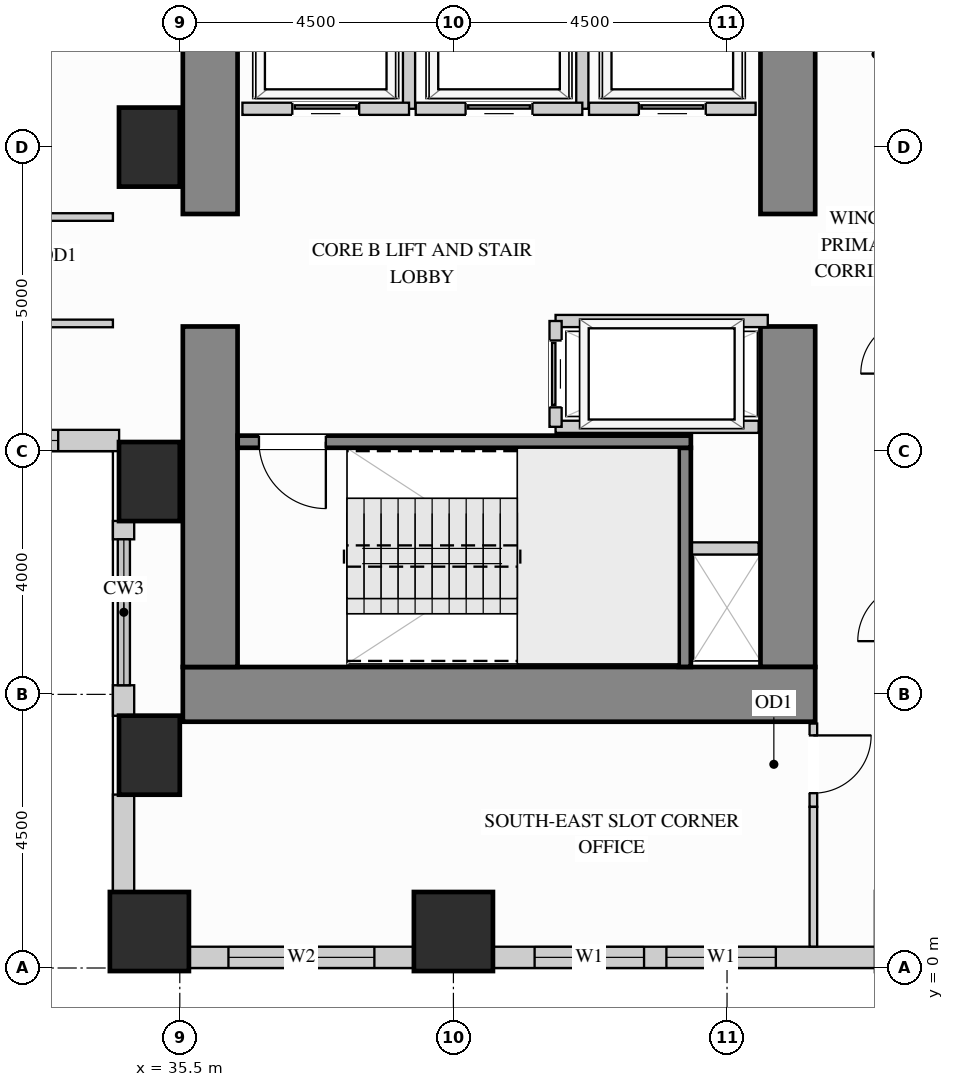
"""IFC4 building model, lengths in metres.
Left out: names, types, materials, properties, quantities, classifications, styles, units other than length and angle.
Written with IfcOpenShell. Run it as: python <this file> out.ifc"""

import sys

from ifc_helpers import new_model, si_unit, direction, frame, frame_2d, origin, origin_2d, place, context, subcontext, project, spatial, rectangle, extrude, source, transform, mapped, element, fill, save


model = new_model("IFC4")
c1 = context("Model", 3, precision=1e-05, world=origin(), true_north=direction((0.0, 1.0)))
c2 = subcontext(c1, "Body", "Model", "MODEL_VIEW")
j1 = project(units=[si_unit("LENGTHUNIT", "METRE"), si_unit("PLANEANGLEUNIT", "RADIAN")], contexts=[c1])
p1 = place(None, origin())
s1 = spatial("IfcSite", under=j1, at=p1, CompositionType="ELEMENT")
p2 = place(p1, origin())
s2 = spatial("IfcBuilding", under=s1, at=p2, CompositionType="ELEMENT")
p3 = place(p2, frame((0.0, 0.0, 29.7)))
s3 = spatial("IfcBuildingStorey", under=s2, at=p3, CompositionType="ELEMENT", Elevation=29.7)
m1 = source(origin(), c2, "Body", "SweptSolid", [
    extrude(rectangle(XDim=1.0, YDim=1.3, at=origin_2d()), origin(), (0.0, 0.0, 1.0), 3.38),
])
for number, where, z_axis, x_axis in (
    (1, (35.0, 13.5, 0.0), (0.0, 0.0, 1.0), (1.0, 0.0, 0.0)),
    (2, (35.0, 3.5, 0.0), (0.0, 0.0, 1.0), (1.0, 0.0, 0.0)),
    (3, (35.0, 8.0, 0.0), (0.0, 0.0, 1.0), (1.0, 0.0, 0.0)),
):
    element("IfcColumn", number, at=place(p3, frame(where, z_axis=z_axis, x_axis=x_axis)), inside=s3, PredefinedType="COLUMN", context=c2, shape_type="MappedRepresentation", body=[
        mapped(m1, transform((0.0, 0.0, 0.0), x_axis=(1.0, 0.0, 0.0), y_axis=(0.0, 1.0, 0.0), z_axis=(0.0, 0.0, 1.0))),
    ])
m2 = source(origin(), c2, "Body", "SweptSolid", [
    extrude(rectangle(XDim=1.3, YDim=1.3, at=origin_2d()), origin(), (0.0, 0.0, 1.0), 3.38),
])
for number, where, z_axis, x_axis in (
    (4, (35.0, 0.6, 0.0), (0.0, 0.0, 1.0), (1.0, 0.0, 0.0)),
    (5, (40.0, 0.6, 0.0), (0.0, 0.0, 1.0), (1.0, 0.0, 0.0)),
):
    element("IfcColumn", number, at=place(p3, frame(where, z_axis=z_axis, x_axis=x_axis)), inside=s3, PredefinedType="COLUMN", context=c2, shape_type="MappedRepresentation", body=[
        mapped(m2, transform((0.0, 0.0, 0.0), x_axis=(1.0, 0.0, 0.0), y_axis=(0.0, 1.0, 0.0), z_axis=(0.0, 0.0, 1.0))),
    ])
m3 = source(origin(), c2, "Body", "SweptSolid", [
    extrude(rectangle(XDim=5.6, YDim=0.9, at=frame_2d((2.8, 0.0))), origin(), (0.0, 0.0, 1.0), 3.38),
])
p4 = place(p3, frame((45.5, 4.95, 0.0), z_axis=(0.0, 0.0, 1.0), x_axis=(0.0, 1.0, 0.0)))
e6 = element("IfcWall", 6, at=p4, inside=s3, PredefinedType="SHEAR", context=c2, shape_type="MappedRepresentation", body=[
    mapped(m3, transform((0.0, 0.0, 0.0), x_axis=(1.0, 0.0, 0.0), y_axis=(0.0, 1.0, 0.0), z_axis=(0.0, 0.0, 1.0))),
])
m4 = source(origin(), c2, "Body", "SweptSolid", [
    extrude(rectangle(XDim=3.65, YDim=0.9, at=frame_2d((1.825, 0.0))), origin(), (0.0, 0.0, 1.0), 3.38),
])
p5 = place(p3, frame((45.5, 12.4, 0.0), z_axis=(0.0, 0.0, 1.0), x_axis=(0.0, 1.0, 0.0)))
e7 = element("IfcWall", 7, at=p5, inside=s3, PredefinedType="SHEAR", context=c2, shape_type="MappedRepresentation", body=[
    mapped(m4, transform((0.0, 0.0, 0.0), x_axis=(1.0, 0.0, 0.0), y_axis=(0.0, 1.0, 0.0), z_axis=(0.0, 0.0, 1.0))),
])
m5 = source(origin(), c2, "Body", "SweptSolid", [
    extrude(rectangle(XDim=10.4, YDim=0.9, at=frame_2d((5.2, 0.0))), origin(), (0.0, 0.0, 1.0), 3.38),
])
p6 = place(p3, frame((35.55, 4.5, 0.0), z_axis=(0.0, 0.0, 1.0), x_axis=(1.0, 0.0, 0.0)))
e8 = element("IfcWall", 8, at=p6, inside=s3, PredefinedType="SHEAR", context=c2, shape_type="MappedRepresentation", body=[
    mapped(m5, transform((0.0, 0.0, 0.0), x_axis=(1.0, 0.0, 0.0), y_axis=(0.0, 1.0, 0.0), z_axis=(0.0, 0.0, 1.0))),
])
p7 = place(p3, frame((36.0, 4.95, 0.0), z_axis=(0.0, 0.0, 1.0), x_axis=(0.0, 1.0, 0.0)))
e9 = element("IfcWall", 9, at=p7, inside=s3, PredefinedType="SHEAR", context=c2, shape_type="MappedRepresentation", body=[
    mapped(m3, transform((0.0, 0.0, 0.0), x_axis=(1.0, 0.0, 0.0), y_axis=(0.0, 1.0, 0.0), z_axis=(0.0, 0.0, 1.0))),
])
p8 = place(p3, frame((36.0, 12.4, 0.0), z_axis=(0.0, 0.0, 1.0), x_axis=(0.0, 1.0, 0.0)))
e10 = element("IfcWall", 10, at=p8, inside=s3, PredefinedType="SHEAR", context=c2, shape_type="MappedRepresentation", body=[
    mapped(m4, transform((0.0, 0.0, 0.0), x_axis=(1.0, 0.0, 0.0), y_axis=(0.0, 1.0, 0.0), z_axis=(0.0, 0.0, 1.0))),
])
p9 = place(p3, frame((30.998, 8.675, 0.0), z_axis=(0.0, 0.0, 1.0), x_axis=(1.0, 0.0, 0.0)))
e11 = element("IfcWall", 11, at=p9, inside=s3, PredefinedType="SOLIDWALL", context=c2, shape_type="SweptSolid", body=[
    extrude(rectangle(XDim=3.504, YDim=0.35, at=frame_2d((1.752, 0.0))), origin(), (0.0, 0.0, 1.0), 3.365),
])
p10 = place(p9, frame((1.002, 0.0, 0.78)))
e12 = element("IfcOpeningElement", 12, at=p10, cuts=e11, PredefinedType="OPENING", context=c2, shape_type="SweptSolid", body=[
    extrude(rectangle(XDim=1.5, YDim=2.0, at=frame_2d((0.75, 1.0))), frame((0.0, 0.185, 0.0), z_axis=(0.0, -1.0, 0.0), x_axis=(1.0, 0.0, 0.0)), (0.0, 0.0, 1.0), 0.37),
])
m6 = source(origin(), c2, "Body", "SweptSolid", [
    extrude(rectangle(XDim=0.302, YDim=0.35, at=frame_2d((0.151, 0.0))), origin(), (0.0, 0.0, 1.0), 2.51),
])
p11 = place(p3, frame((34.575, 7.352, 0.0), z_axis=(0.0, 0.0, 1.0), x_axis=(0.0, -1.0, 0.0)))
e13 = element("IfcWall", 13, at=p11, inside=s3, PredefinedType="SOLIDWALL", context=c2, shape_type="MappedRepresentation", body=[
    mapped(m6, transform((0.0, 0.0, 0.0), x_axis=(1.0, 0.0, 0.0), y_axis=(0.0, 1.0, 0.0), z_axis=(0.0, 0.0, 1.0))),
])
m7 = source(origin(), c2, "Body", "SweptSolid", [
    extrude(rectangle(XDim=0.502, YDim=0.35, at=frame_2d((0.251, 0.0))), origin(), (0.0, 0.0, 1.0), 2.51),
])
p12 = place(p3, frame((34.575, 4.65, 0.0), z_axis=(0.0, 0.0, 1.0), x_axis=(0.0, -1.0, 0.0)))
e14 = element("IfcWall", 14, at=p12, inside=s3, PredefinedType="SOLIDWALL", context=c2, shape_type="MappedRepresentation", body=[
    mapped(m7, transform((0.0, 0.0, 0.0), x_axis=(1.0, 0.0, 0.0), y_axis=(0.0, 1.0, 0.0), z_axis=(0.0, 0.0, 1.0))),
])
m8 = source(origin(), c2, "Body", "SweptSolid", [
    extrude(rectangle(XDim=1.604, YDim=0.35, at=frame_2d((0.802, 0.0))), origin(), (0.0, 0.0, 1.0), 2.51),
])
p13 = place(p3, frame((34.575, 2.852, 0.0), z_axis=(0.0, 0.0, 1.0), x_axis=(0.0, -1.0, 0.0)))
e15 = element("IfcWall", 15, at=p13, inside=s3, PredefinedType="SOLIDWALL", context=c2, shape_type="MappedRepresentation", body=[
    mapped(m8, transform((0.0, 0.0, 0.0), x_axis=(1.0, 0.0, 0.0), y_axis=(0.0, 1.0, 0.0), z_axis=(0.0, 0.0, 1.0))),
])
p14 = place(p3, frame((35.648, 0.175, 0.0), z_axis=(0.0, 0.0, 1.0), x_axis=(1.0, 0.0, 0.0)))
e16 = element("IfcWall", 16, at=p14, inside=s3, PredefinedType="SOLIDWALL", context=c2, shape_type="SweptSolid", body=[
    extrude(rectangle(XDim=3.704, YDim=0.35, at=frame_2d((1.852, 0.0))), origin(), (0.0, 0.0, 1.0), 2.428),
])
p15 = place(p14, frame((0.652, 0.0, 0.78)))
e17 = element("IfcOpeningElement", 17, at=p15, cuts=e16, PredefinedType="OPENING", context=c2, shape_type="SweptSolid", body=[
    extrude(rectangle(XDim=2.4, YDim=1.468, at=frame_2d((1.2, 0.734))), frame((0.0, 0.185, 0.0), z_axis=(0.0, -1.0, 0.0), x_axis=(1.0, 0.0, 0.0)), (0.0, 0.0, 1.0), 0.37),
])
p16 = place(p3, frame((40.648, 0.175, 0.0), z_axis=(0.0, 0.0, 1.0), x_axis=(1.0, 0.0, 0.0)))
e18 = element("IfcWall", 18, at=p16, inside=s3, PredefinedType="SOLIDWALL", context=c2, shape_type="SweptSolid", body=[
    extrude(rectangle(XDim=6.304, YDim=0.35, at=frame_2d((3.152, 0.0))), origin(), (0.0, 0.0, 1.0), 2.428),
])
p17 = place(p16, frame((0.687, 0.0, 0.78)))
e19 = element("IfcOpeningElement", 19, at=p17, cuts=e18, PredefinedType="OPENING", context=c2, shape_type="SweptSolid", body=[
    extrude(rectangle(XDim=1.8, YDim=1.468, at=frame_2d((0.9, 0.734))), frame((0.0, 0.185, 0.0), z_axis=(0.0, -1.0, 0.0), x_axis=(1.0, 0.0, 0.0)), (0.0, 0.0, 1.0), 0.37),
])
p18 = place(p16, frame((2.855, 0.0, 0.78)))
e20 = element("IfcOpeningElement", 20, at=p18, cuts=e18, PredefinedType="OPENING", context=c2, shape_type="SweptSolid", body=[
    extrude(rectangle(XDim=1.8, YDim=1.468, at=frame_2d((0.9, 0.734))), frame((0.0, 0.185, 0.0), z_axis=(0.0, -1.0, 0.0), x_axis=(1.0, 0.0, 0.0)), (0.0, 0.0, 1.0), 0.37),
])
p19 = place(p3, frame((45.92, 2.65, 0.0), z_axis=(0.0, 0.0, 1.0), x_axis=(0.0, 1.0, 0.0)))
e21 = element("IfcWall", 21, at=p19, inside=s3, PredefinedType="PARTITIONING", context=c2, shape_type="SweptSolid", body=[
    extrude(rectangle(XDim=1.37, YDim=0.125, at=frame_2d((0.685, 0.0))), origin(), (0.0, 0.0, 1.0), 3.365),
])
p20 = place(p19, frame((0.225, 0.0, 0.0)))
e22 = element("IfcOpeningElement", 22, at=p20, cuts=e21, PredefinedType="OPENING", context=c2, shape_type="SweptSolid", body=[
    extrude(rectangle(XDim=0.95, YDim=2.15, at=frame_2d((0.475, 1.075))), frame((0.0, 0.073, 0.0), z_axis=(0.0, -1.0, 0.0), x_axis=(1.0, 0.0, 0.0)), (0.0, 0.0, 1.0), 0.145),
])
m9 = source(origin(), c2, "Body", "SweptSolid", [
    extrude(rectangle(XDim=2.298, YDim=0.125, at=frame_2d((1.149, 0.0))), origin(), (0.0, 0.0, 1.0), 3.365),
])
p21 = place(p3, frame((45.92, 0.352, 0.0), z_axis=(0.0, 0.0, 1.0), x_axis=(0.0, 1.0, 0.0)))
e23 = element("IfcWall", 23, at=p21, inside=s3, PredefinedType="PARTITIONING", context=c2, shape_type="MappedRepresentation", body=[
    mapped(m9, transform((0.0, 0.0, 0.0), x_axis=(1.0, 0.0, 0.0), y_axis=(0.0, 1.0, 0.0), z_axis=(0.0, 0.0, 1.0))),
])
p22 = place(p3, frame((29.85, 12.35, 0.0), z_axis=(0.0, 0.0, 1.0), x_axis=(1.0, 0.0, 0.0)))
e24 = element("IfcWall", 24, at=p22, inside=s3, PredefinedType="PARTITIONING", context=c2, shape_type="SweptSolid", body=[
    extrude(rectangle(XDim=4.55, YDim=0.125, at=frame_2d((2.275, 0.0))), origin(), (0.0, 0.0, 1.0), 3.365),
])
p23 = place(p22, frame((1.8, 0.0, 0.0)))
e25 = element("IfcOpeningElement", 25, at=p23, cuts=e24, PredefinedType="OPENING", context=c2, shape_type="SweptSolid", body=[
    extrude(rectangle(XDim=0.95, YDim=2.15, at=frame_2d((0.475, 1.075))), frame((0.0, 0.073, 0.0), z_axis=(0.0, -1.0, 0.0), x_axis=(1.0, 0.0, 0.0)), (0.0, 0.0, 1.0), 0.145),
])
p24 = place(p3, frame((29.85, 10.6, 0.0), z_axis=(0.0, 0.0, 1.0), x_axis=(1.0, 0.0, 0.0)))
e26 = element("IfcWall", 26, at=p24, inside=s3, PredefinedType="PARTITIONING", context=c2, shape_type="SweptSolid", body=[
    extrude(rectangle(XDim=4.55, YDim=0.125, at=frame_2d((2.275, 0.0))), origin(), (0.0, 0.0, 1.0), 3.365),
])
p25 = place(p24, frame((1.8, 0.0, 0.0)))
e27 = element("IfcOpeningElement", 27, at=p25, cuts=e26, PredefinedType="OPENING", context=c2, shape_type="SweptSolid", body=[
    extrude(rectangle(XDim=0.95, YDim=2.15, at=frame_2d((0.475, 1.075))), frame((0.0, 0.073, 0.0), z_axis=(0.0, -1.0, 0.0), x_axis=(1.0, 0.0, 0.0)), (0.0, 0.0, 1.0), 0.145),
])
m10 = source(origin(), c2, "Body", "SweptSolid", [
    extrude(rectangle(XDim=1.17, YDim=0.2, at=frame_2d((0.585, 0.0))), origin(), (0.0, 0.0, 1.0), 3.365),
])
p26 = place(p3, frame((43.85, 6.9, 0.0), z_axis=(0.0, 0.0, 1.0), x_axis=(1.0, 0.0, 0.0)))
e28 = element("IfcWall", 28, at=p26, inside=s3, PredefinedType="PARTITIONING", context=c2, shape_type="MappedRepresentation", body=[
    mapped(m10, transform((0.0, 0.0, 0.0), x_axis=(1.0, 0.0, 0.0), y_axis=(0.0, 1.0, 0.0), z_axis=(0.0, 0.0, 1.0))),
])
m11 = source(origin(), c2, "Body", "SweptSolid", [
    extrude(rectangle(XDim=1.89, YDim=0.2, at=frame_2d((0.945, 0.0))), origin(), (0.0, 0.0, 1.0), 3.365),
])
p27 = place(p3, frame((39.27, 14.13, 0.0), z_axis=(0.0, 0.0, 1.0), x_axis=(0.0, 1.0, 0.0)))
e29 = element("IfcWall", 29, at=p27, inside=s3, PredefinedType="PARTITIONING", context=c2, shape_type="MappedRepresentation", body=[
    mapped(m11, transform((0.0, 0.0, 0.0), x_axis=(1.0, 0.0, 0.0), y_axis=(0.0, 1.0, 0.0), z_axis=(0.0, 0.0, 1.0))),
])
p28 = place(p3, frame((36.53, 14.13, 0.0), z_axis=(0.0, 0.0, 1.0), x_axis=(1.0, 0.0, 0.0)))
e30 = element("IfcWall", 30, at=p28, inside=s3, PredefinedType="PARTITIONING", context=c2, shape_type="SweptSolid", body=[
    extrude(rectangle(XDim=2.74, YDim=0.2, at=frame_2d((1.37, 0.0))), origin(), (0.0, 0.0, 1.0), 3.365),
])
p29 = place(p28, frame((0.82, 0.0, 0.0)))
e31 = element("IfcOpeningElement", 31, at=p29, cuts=e30, PredefinedType="OPENING", context=c2, shape_type="SweptSolid", body=[
    extrude(rectangle(XDim=1.1, YDim=2.2, at=frame_2d((0.55, 1.1))), frame((0.0, 0.11, 0.0), z_axis=(0.0, -1.0, 0.0), x_axis=(1.0, 0.0, 0.0)), (0.0, 0.0, 1.0), 0.22),
])
p30 = place(p3, frame((42.12, 14.13, 0.0), z_axis=(0.0, 0.0, 1.0), x_axis=(0.0, 1.0, 0.0)))
e32 = element("IfcWall", 32, at=p30, inside=s3, PredefinedType="PARTITIONING", context=c2, shape_type="MappedRepresentation", body=[
    mapped(m11, transform((0.0, 0.0, 0.0), x_axis=(1.0, 0.0, 0.0), y_axis=(0.0, 1.0, 0.0), z_axis=(0.0, 0.0, 1.0))),
])
p31 = place(p3, frame((39.38, 14.13, 0.0), z_axis=(0.0, 0.0, 1.0), x_axis=(1.0, 0.0, 0.0)))
e33 = element("IfcWall", 33, at=p31, inside=s3, PredefinedType="PARTITIONING", context=c2, shape_type="SweptSolid", body=[
    extrude(rectangle(XDim=2.74, YDim=0.2, at=frame_2d((1.37, 0.0))), origin(), (0.0, 0.0, 1.0), 3.365),
])
p32 = place(p31, frame((0.82, 0.0, 0.0)))
e34 = element("IfcOpeningElement", 34, at=p32, cuts=e33, PredefinedType="OPENING", context=c2, shape_type="SweptSolid", body=[
    extrude(rectangle(XDim=1.1, YDim=2.2, at=frame_2d((0.55, 1.1))), frame((0.0, 0.11, 0.0), z_axis=(0.0, -1.0, 0.0), x_axis=(1.0, 0.0, 0.0)), (0.0, 0.0, 1.0), 0.22),
])
p33 = place(p3, frame((42.23, 14.13, 0.0), z_axis=(0.0, 0.0, 1.0), x_axis=(1.0, 0.0, 0.0)))
e35 = element("IfcWall", 35, at=p33, inside=s3, PredefinedType="PARTITIONING", context=c2, shape_type="SweptSolid", body=[
    extrude(rectangle(XDim=2.74, YDim=0.2, at=frame_2d((1.37, 0.0))), origin(), (0.0, 0.0, 1.0), 3.365),
])
p34 = place(p33, frame((0.82, 0.0, 0.0)))
e36 = element("IfcOpeningElement", 36, at=p34, cuts=e35, PredefinedType="OPENING", context=c2, shape_type="SweptSolid", body=[
    extrude(rectangle(XDim=1.1, YDim=2.2, at=frame_2d((0.55, 1.1))), frame((0.0, 0.11, 0.0), z_axis=(0.0, -1.0, 0.0), x_axis=(1.0, 0.0, 0.0)), (0.0, 0.0, 1.0), 0.22),
])
m12 = source(origin(), c2, "Body", "SweptSolid", [
    extrude(rectangle(XDim=3.49, YDim=0.2, at=frame_2d((1.745, 0.0))), origin(), (0.0, 0.0, 1.0), 3.365),
])
p35 = place(p3, frame((41.68, 10.64, 0.0), z_axis=(0.0, 0.0, 1.0), x_axis=(1.0, 0.0, 0.0)))
e37 = element("IfcWall", 37, at=p35, inside=s3, PredefinedType="PARTITIONING", context=c2, shape_type="MappedRepresentation", body=[
    mapped(m12, transform((0.0, 0.0, 0.0), x_axis=(1.0, 0.0, 0.0), y_axis=(0.0, 1.0, 0.0), z_axis=(0.0, 0.0, 1.0))),
])
m13 = source(origin(), c2, "Body", "SweptSolid", [
    extrude(rectangle(XDim=3.34, YDim=0.2, at=frame_2d((1.67, 0.0))), origin(), (0.0, 0.0, 1.0), 3.365),
])
p36 = place(p3, frame((41.68, 8.9, 0.0), z_axis=(0.0, 0.0, 1.0), x_axis=(1.0, 0.0, 0.0)))
e38 = element("IfcWall", 38, at=p36, inside=s3, PredefinedType="PARTITIONING", context=c2, shape_type="MappedRepresentation", body=[
    mapped(m13, transform((0.0, 0.0, 0.0), x_axis=(1.0, 0.0, 0.0), y_axis=(0.0, 1.0, 0.0), z_axis=(0.0, 0.0, 1.0))),
])
p37 = place(p3, frame((41.68, 8.9, 0.0), z_axis=(0.0, 0.0, 1.0), x_axis=(0.0, 1.0, 0.0)))
e39 = element("IfcWall", 39, at=p37, inside=s3, PredefinedType="PARTITIONING", context=c2, shape_type="SweptSolid", body=[
    extrude(rectangle(XDim=1.74, YDim=0.2, at=frame_2d((0.87, 0.0))), origin(), (0.0, 0.0, 1.0), 3.365),
])
p38 = place(p37, frame((0.32, 0.0, 0.0)))
e40 = element("IfcOpeningElement", 40, at=p38, cuts=e39, PredefinedType="OPENING", context=c2, shape_type="SweptSolid", body=[
    extrude(rectangle(XDim=1.1, YDim=2.2, at=frame_2d((0.55, 1.1))), frame((0.0, 0.11, 0.0), z_axis=(0.0, -1.0, 0.0), x_axis=(1.0, 0.0, 0.0)), (0.0, 0.0, 1.0), 0.22),
])
m14 = source(origin(), c2, "Body", "SweptSolid", [
    extrude(rectangle(XDim=3.603, YDim=0.2, at=frame_2d((1.802, 0.0))), origin(), (0.0, 0.0, 1.0), 3.38),
])
p39 = place(p3, frame((43.805, 4.952, 0.0), z_axis=(0.0, 0.0, 1.0), x_axis=(0.0, 1.0, 0.0)))
e41 = element("IfcWall", 41, at=p39, inside=s3, PredefinedType="SHEAR", context=c2, shape_type="MappedRepresentation", body=[
    mapped(m14, transform((0.0, 0.0, 0.0), x_axis=(1.0, 0.0, 0.0), y_axis=(0.0, 1.0, 0.0), z_axis=(0.0, 0.0, 1.0))),
])
p40 = place(p3, frame((36.452, 8.655, 0.0), z_axis=(0.0, 0.0, 1.0), x_axis=(1.0, 0.0, 0.0)))
e42 = element("IfcWall", 42, at=p40, inside=s3, PredefinedType="SHEAR", context=c2, shape_type="SweptSolid", body=[
    extrude(rectangle(XDim=7.453, YDim=0.2, at=frame_2d((3.727, 0.0))), origin(), (0.0, 0.0, 1.0), 3.38),
])
p41 = place(p40, frame((0.35, 0.0, 0.0)))
e43 = element("IfcOpeningElement", 43, at=p41, cuts=e42, PredefinedType="OPENING", context=c2, shape_type="SweptSolid", body=[
    extrude(rectangle(XDim=1.1, YDim=2.15, at=frame_2d((0.55, 1.075))), frame((0.0, 0.11, 0.0), z_axis=(0.0, -1.0, 0.0), x_axis=(1.0, 0.0, 0.0)), (0.0, 0.0, 1.0), 0.22),
])
m15 = source(origin(), c2, "Body", "SweptSolid", [
    extrude(rectangle(XDim=1.1, YDim=2.2, at=frame_2d((0.55, 1.1))), frame((0.0, 0.025, 0.0), z_axis=(0.0, -1.0, 0.0), x_axis=(1.0, 0.0, 0.0)), (0.0, 0.0, 1.0), 0.05),
])
p42 = place(p29, origin())
e44 = element("IfcDoor", 44, at=p42, inside=s3, OperationType="SLIDING_TO_LEFT", PredefinedType="DOOR", context=c2, shape_type="MappedRepresentation", body=[
    mapped(m15, transform((0.0, 0.0, 0.0), x_axis=(1.0, 0.0, 0.0), y_axis=(0.0, 1.0, 0.0), z_axis=(0.0, 0.0, 1.0))),
])
fill(e31, e44)
p43 = place(p32, origin())
e45 = element("IfcDoor", 45, at=p43, inside=s3, OperationType="SLIDING_TO_LEFT", PredefinedType="DOOR", context=c2, shape_type="MappedRepresentation", body=[
    mapped(m15, transform((0.0, 0.0, 0.0), x_axis=(1.0, 0.0, 0.0), y_axis=(0.0, 1.0, 0.0), z_axis=(0.0, 0.0, 1.0))),
])
fill(e34, e45)
p44 = place(p34, origin())
e46 = element("IfcDoor", 46, at=p44, inside=s3, OperationType="SLIDING_TO_LEFT", PredefinedType="DOOR", context=c2, shape_type="MappedRepresentation", body=[
    mapped(m15, transform((0.0, 0.0, 0.0), x_axis=(1.0, 0.0, 0.0), y_axis=(0.0, 1.0, 0.0), z_axis=(0.0, 0.0, 1.0))),
])
fill(e36, e46)
p45 = place(p38, origin())
e47 = element("IfcDoor", 47, at=p45, inside=s3, OperationType="SLIDING_TO_LEFT", PredefinedType="DOOR", context=c2, shape_type="MappedRepresentation", body=[
    mapped(m15, transform((0.0, 0.0, 0.0), x_axis=(1.0, 0.0, 0.0), y_axis=(0.0, 1.0, 0.0), z_axis=(0.0, 0.0, 1.0))),
])
fill(e40, e47)
m16 = source(origin(), c2, "Body", "SweptSolid", [
    extrude(rectangle(XDim=0.95, YDim=2.15, at=frame_2d((0.475, 1.075))), frame((0.0, 0.025, 0.0), z_axis=(0.0, -1.0, 0.0), x_axis=(1.0, 0.0, 0.0)), (0.0, 0.0, 1.0), 0.05),
])
p46 = place(p20, origin())
e48 = element("IfcDoor", 48, at=p46, inside=s3, OperationType="SINGLE_SWING_RIGHT", PredefinedType="DOOR", context=c2, shape_type="MappedRepresentation", body=[
    mapped(m16, transform((0.0, 0.0, 0.0), x_axis=(1.0, 0.0, 0.0), y_axis=(0.0, 1.0, 0.0), z_axis=(0.0, 0.0, 1.0))),
])
fill(e22, e48)
m17 = source(origin(), c2, "Body", "SweptSolid", [
    extrude(rectangle(XDim=1.1, YDim=2.15, at=frame_2d((0.55, 1.075))), frame((0.0, 0.025, 0.0), z_axis=(0.0, -1.0, 0.0), x_axis=(1.0, 0.0, 0.0)), (0.0, 0.0, 1.0), 0.05),
])
p47 = place(p41, origin())
e49 = element("IfcDoor", 49, at=p47, inside=s3, OperationType="SINGLE_SWING_RIGHT", PredefinedType="DOOR", context=c2, shape_type="MappedRepresentation", body=[
    mapped(m17, transform((0.0, 0.0, 0.0), x_axis=(1.0, 0.0, 0.0), y_axis=(0.0, 1.0, 0.0), z_axis=(0.0, 0.0, 1.0))),
])
fill(e43, e49)
m18 = source(origin(), c2, "Body", "SweptSolid", [
    extrude(rectangle(XDim=1.8, YDim=1.468, at=frame_2d((0.9, 0.734))), frame((0.0, 0.03, 0.0), z_axis=(0.0, -1.0, 0.0), x_axis=(1.0, 0.0, 0.0)), (0.0, 0.0, 1.0), 0.06),
])
p48 = place(p17, origin())
e50 = element("IfcWindow", 50, at=p48, inside=s3, PartitioningType="SINGLE_PANEL", PredefinedType="WINDOW", context=c2, shape_type="MappedRepresentation", body=[
    mapped(m18, transform((0.0, 0.0, 0.0), x_axis=(1.0, 0.0, 0.0), y_axis=(0.0, 1.0, 0.0), z_axis=(0.0, 0.0, 1.0))),
])
fill(e19, e50)
p49 = place(p18, origin())
e51 = element("IfcWindow", 51, at=p49, inside=s3, PartitioningType="SINGLE_PANEL", PredefinedType="WINDOW", context=c2, shape_type="MappedRepresentation", body=[
    mapped(m18, transform((0.0, 0.0, 0.0), x_axis=(1.0, 0.0, 0.0), y_axis=(0.0, 1.0, 0.0), z_axis=(0.0, 0.0, 1.0))),
])
fill(e20, e51)
m19 = source(origin(), c2, "Body", "SweptSolid", [
    extrude(rectangle(XDim=2.4, YDim=1.468, at=frame_2d((1.2, 0.734))), frame((0.0, 0.03, 0.0), z_axis=(0.0, -1.0, 0.0), x_axis=(1.0, 0.0, 0.0)), (0.0, 0.0, 1.0), 0.06),
])
p50 = place(p15, origin())
e52 = element("IfcWindow", 52, at=p50, inside=s3, PartitioningType="SINGLE_PANEL", PredefinedType="WINDOW", context=c2, shape_type="MappedRepresentation", body=[
    mapped(m19, transform((0.0, 0.0, 0.0), x_axis=(1.0, 0.0, 0.0), y_axis=(0.0, 1.0, 0.0), z_axis=(0.0, 0.0, 1.0))),
])
fill(e17, e52)
m20 = source(origin(), c2, "Body", "SweptSolid", [
    extrude(rectangle(XDim=1.5, YDim=2.0, at=frame_2d((0.75, 1.0))), frame((0.0, 0.03, 0.0), z_axis=(0.0, -1.0, 0.0), x_axis=(1.0, 0.0, 0.0)), (0.0, 0.0, 1.0), 0.06),
])
p51 = place(p10, origin())
e53 = element("IfcWindow", 53, at=p51, inside=s3, PartitioningType="SINGLE_PANEL", PredefinedType="WINDOW", context=c2, shape_type="MappedRepresentation", body=[
    mapped(m20, transform((0.0, 0.0, 0.0), x_axis=(1.0, 0.0, 0.0), y_axis=(0.0, 1.0, 0.0), z_axis=(0.0, 0.0, 1.0))),
])
fill(e12, e53)
save(model, sys.argv[1])
